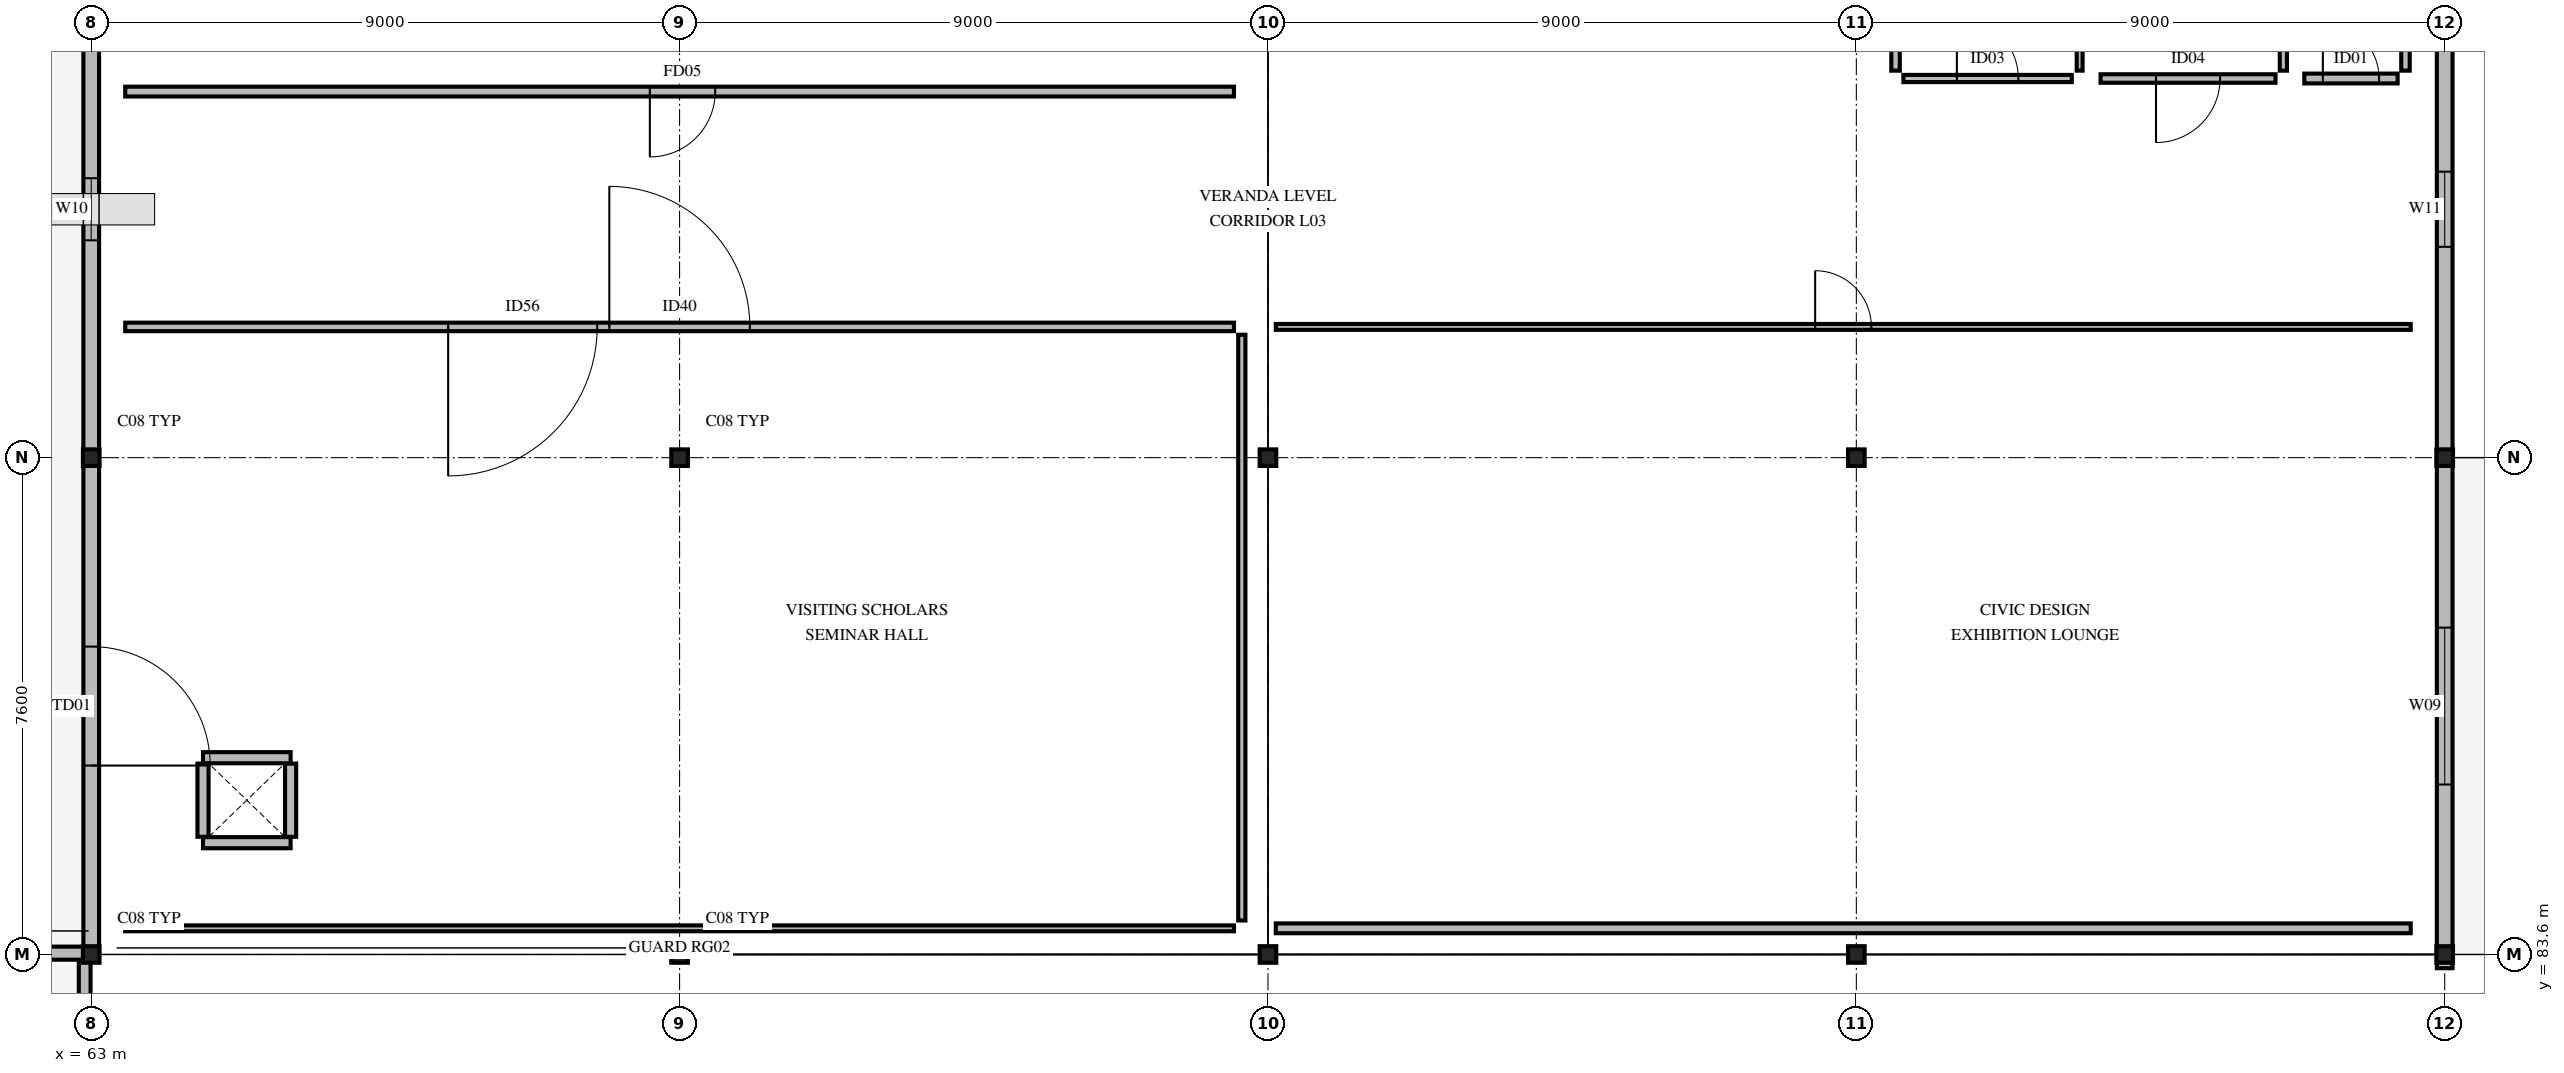
"""IFC4 building model, lengths in metres.
Left out: names, types, materials, properties, quantities, classifications, styles, units other than length and angle.
Written with IfcOpenShell. Run it as: python <this file> out.ifc"""

import sys

from ifc_helpers import new_model, si_unit, direction, frame, frame_2d, origin, origin_2d, place, context, subcontext, project, spatial, rectangle, i_section, extrude, element, fill, save


model = new_model("IFC4")
c1 = context("Model", 3, precision=1e-05, world=origin(), true_north=direction((0.0, 1.0)))
c2 = subcontext(c1, "Body", "Model", "MODEL_VIEW")
j1 = project(units=[si_unit("LENGTHUNIT", "METRE"), si_unit("PLANEANGLEUNIT", "RADIAN")], contexts=[c1])
p1 = place(None, origin())
s1 = spatial("IfcSite", under=j1, at=p1, CompositionType="ELEMENT")
p2 = place(p1, origin())
s2 = spatial("IfcBuilding", under=s1, at=p2, CompositionType="ELEMENT")
p3 = place(p2, frame((0.0, 0.0, 13.68)))
s3 = spatial("IfcBuildingStorey", under=s2, at=p3, CompositionType="ELEMENT", Elevation=13.68)
for number, where, z_axis, x_axis in (
    (1, (63.0, 83.6, 0.0), (0.0, 0.0, 1.0), (1.0, 0.0, 0.0)),
    (2, (63.0, 91.2, 0.0), (0.0, 0.0, 1.0), (1.0, 0.0, 0.0)),
    (3, (72.0, 83.6, 0.0), (0.0, 0.0, 1.0), (1.0, 0.0, 0.0)),
    (4, (72.0, 91.2, 0.0), (0.0, 0.0, 1.0), (1.0, 0.0, 0.0)),
    (5, (81.0, 83.6, 0.0), (0.0, 0.0, 1.0), (1.0, 0.0, 0.0)),
    (6, (81.0, 91.2, 0.0), (0.0, 0.0, 1.0), (1.0, 0.0, 0.0)),
    (7, (90.0, 83.6, 0.0), (0.0, 0.0, 1.0), (1.0, 0.0, 0.0)),
    (8, (90.0, 91.2, 0.0), (0.0, 0.0, 1.0), (1.0, 0.0, 0.0)),
    (9, (99.0, 83.6, 0.0), (0.0, 0.0, 1.0), (1.0, 0.0, 0.0)),
    (10, (99.0, 91.2, 0.0), (0.0, 0.0, 1.0), (1.0, 0.0, 0.0)),
):
    element("IfcColumn", number, at=place(p3, frame(where, z_axis=z_axis, x_axis=x_axis)), inside=s3, PredefinedType="COLUMN", context=c2, shape_type="SweptSolid", body=[
        extrude(i_section(OverallWidth=0.254, OverallDepth=0.253, WebThickness=0.009, FlangeThickness=0.014, FilletRadius=0.012, at=origin_2d()), origin(), (0.0, 0.0, 1.0), 4.32),
    ])
p4 = place(p3, frame((63.0, 83.6, 0.0), z_axis=(0.0, 0.0, 1.0), x_axis=(0.0, 1.0, 0.0)))
e11 = element("IfcWall", 11, at=p4, inside=s3, PredefinedType="STANDARD", context=c2, shape_type="SweptSolid", body=[
    extrude(rectangle(XDim=7.6, YDim=0.24, at=frame_2d((3.8, 0.0))), origin(), (0.0, 0.0, 1.0), 3.78),
])
p5 = place(p4, frame((2.89, 0.0, 0.0)))
e12 = element("IfcOpeningElement", 12, at=p5, cuts=e11, PredefinedType="OPENING", context=c2, shape_type="SweptSolid", body=[
    extrude(rectangle(XDim=1.82, YDim=2.2, at=frame_2d((0.91, 1.1))), frame((0.0, 0.13, 0.0), z_axis=(0.0, -1.0, 0.0), x_axis=(1.0, 0.0, 0.0)), (0.0, 0.0, 1.0), 0.26),
])
p6 = place(p3, frame((99.0, 83.39, 0.0), z_axis=(0.0, 0.0, 1.0), x_axis=(0.0, 1.0, 0.0)))
e13 = element("IfcWall", 13, at=p6, inside=s3, PredefinedType="STANDARD", context=c2, shape_type="SweptSolid", body=[
    extrude(rectangle(XDim=7.81, YDim=0.24, at=frame_2d((3.905, 0.0))), origin(), (0.0, 0.0, 1.0), 3.78),
])
p7 = place(p6, frame((2.81, 0.0, 0.85)))
e14 = element("IfcOpeningElement", 14, at=p7, cuts=e13, PredefinedType="OPENING", context=c2, shape_type="SweptSolid", body=[
    extrude(rectangle(XDim=2.4, YDim=1.2, at=frame_2d((1.2, 0.6))), frame((0.0, 0.13, 0.0), z_axis=(0.0, -1.0, 0.0), x_axis=(1.0, 0.0, 0.0)), (0.0, 0.0, 1.0), 0.26),
])
p8 = place(p3, frame((63.0, 91.2, 0.0), z_axis=(0.0, 0.0, 1.0), x_axis=(0.0, 1.0, 0.0)))
e15 = element("IfcWall", 15, at=p8, inside=s3, PredefinedType="STANDARD", context=c2, shape_type="SweptSolid", body=[
    extrude(rectangle(XDim=7.6, YDim=0.24, at=frame_2d((3.8, 0.0))), origin(), (0.0, 0.0, 1.0), 3.78),
])
p9 = place(p8, frame((3.325, 0.0, 0.85)))
e16 = element("IfcOpeningElement", 16, at=p9, cuts=e15, PredefinedType="OPENING", context=c2, shape_type="SweptSolid", body=[
    extrude(rectangle(XDim=0.95, YDim=1.35, at=frame_2d((0.475, 0.675))), frame((0.0, 0.13, 0.0), z_axis=(0.0, -1.0, 0.0), x_axis=(1.0, 0.0, 0.0)), (0.0, 0.0, 1.0), 0.26),
])
p10 = place(p3, frame((99.0, 91.2, 0.0), z_axis=(0.0, 0.0, 1.0), x_axis=(0.0, 1.0, 0.0)))
e17 = element("IfcWall", 17, at=p10, inside=s3, PredefinedType="STANDARD", context=c2, shape_type="SweptSolid", body=[
    extrude(rectangle(XDim=7.6, YDim=0.24, at=frame_2d((3.8, 0.0))), origin(), (0.0, 0.0, 1.0), 3.78),
])
p11 = place(p10, frame((3.225, 0.0, 0.85)))
e18 = element("IfcOpeningElement", 18, at=p11, cuts=e17, PredefinedType="OPENING", context=c2, shape_type="SweptSolid", body=[
    extrude(rectangle(XDim=1.15, YDim=1.35, at=frame_2d((0.575, 0.675))), frame((0.0, 0.13, 0.0), z_axis=(0.0, -1.0, 0.0), x_axis=(1.0, 0.0, 0.0)), (0.0, 0.0, 1.0), 0.26),
])
p12 = place(p3, frame((62.9, 60.85, 0.0), z_axis=(0.0, 0.0, 1.0), x_axis=(0.0, 1.0, 0.0)))
e19 = element("IfcWall", 19, at=p12, inside=s3, PredefinedType="PARAPET", context=c2, shape_type="SweptSolid", body=[
    extrude(rectangle(XDim=22.7, YDim=0.18, at=frame_2d((11.35, 0.0))), origin(), (0.0, 0.0, 1.0), 1.05),
])
p13 = place(p3, frame((54.1, 83.62, 0.0), z_axis=(0.0, 0.0, 1.0), x_axis=(1.0, 0.0, 0.0)))
e20 = element("IfcWall", 20, at=p13, inside=s3, PredefinedType="PARAPET", context=c2, shape_type="SweptSolid", body=[
    extrude(rectangle(XDim=8.8, YDim=0.2, at=frame_2d((4.4, 0.0))), origin(), (0.0, 0.0, 1.0), 1.05),
])
p14 = place(p3, frame((64.71, 85.31, 0.0), z_axis=(0.0, 0.0, 1.0), x_axis=(1.0, 0.0, 0.0)))
e21 = element("IfcWall", 21, at=p14, inside=s3, PredefinedType="PARTITIONING", context=c2, shape_type="SweptSolid", body=[
    extrude(rectangle(XDim=1.34, YDim=0.17, at=frame_2d((0.67, 0.0))), origin(), (0.0, 0.0, 1.0), 4.04),
])
p15 = place(p3, frame((66.05, 85.4, 0.0), z_axis=(0.0, 0.0, 1.0), x_axis=(0.0, 1.0, 0.0)))
e22 = element("IfcWall", 22, at=p15, inside=s3, PredefinedType="PARTITIONING", context=c2, shape_type="SweptSolid", body=[
    extrude(rectangle(XDim=1.12, YDim=0.17, at=frame_2d((0.56, 0.0))), origin(), (0.0, 0.0, 1.0), 4.04),
])
p16 = place(p3, frame((66.05, 86.61, 0.0), z_axis=(0.0, 0.0, 1.0), x_axis=(-1.0, 0.0, 0.0)))
e23 = element("IfcWall", 23, at=p16, inside=s3, PredefinedType="PARTITIONING", context=c2, shape_type="SweptSolid", body=[
    extrude(rectangle(XDim=1.34, YDim=0.17, at=frame_2d((0.67, 0.0))), origin(), (0.0, 0.0, 1.0), 4.04),
])
p17 = place(p3, frame((64.71, 86.52, 0.0), z_axis=(0.0, 0.0, 1.0), x_axis=(0.0, -1.0, 0.0)))
e24 = element("IfcWall", 24, at=p17, inside=s3, PredefinedType="PARTITIONING", context=c2, shape_type="SweptSolid", body=[
    extrude(rectangle(XDim=1.12, YDim=0.17, at=frame_2d((0.56, 0.0))), origin(), (0.0, 0.0, 1.0), 4.04),
])
p18 = place(p3, frame((63.52, 93.2, 0.0), z_axis=(0.0, 0.0, 1.0), x_axis=(1.0, 0.0, 0.0)))
e25 = element("IfcWall", 25, at=p18, inside=s3, PredefinedType="PARTITIONING", context=c2, shape_type="SweptSolid", body=[
    extrude(rectangle(XDim=16.96, YDim=0.13, at=frame_2d((8.48, 0.0))), origin(), (0.0, 0.0, 1.0), 4.04),
])
p19 = place(p18, frame((7.405, 0.0, 0.0)))
e26 = element("IfcOpeningElement", 26, at=p19, cuts=e25, PredefinedType="OPENING", context=c2, shape_type="SweptSolid", body=[
    extrude(rectangle(XDim=2.15, YDim=2.15, at=frame_2d((1.075, 1.075))), frame((0.0, 0.075, 0.0), z_axis=(0.0, -1.0, 0.0), x_axis=(1.0, 0.0, 0.0)), (0.0, 0.0, 1.0), 0.15),
])
p20 = place(p18, frame((4.94, 0.0, 0.0)))
e27 = element("IfcOpeningElement", 27, at=p20, cuts=e25, PredefinedType="OPENING", context=c2, shape_type="SweptSolid", body=[
    extrude(rectangle(XDim=2.28, YDim=2.2, at=frame_2d((1.14, 1.1))), frame((0.0, 0.075, 0.0), z_axis=(0.0, -1.0, 0.0), x_axis=(1.0, 0.0, 0.0)), (0.0, 0.0, 1.0), 0.15),
])
p21 = place(p3, frame((80.6, 84.12, 0.0), z_axis=(0.0, 0.0, 1.0), x_axis=(0.0, 1.0, 0.0)))
e28 = element("IfcWall", 28, at=p21, inside=s3, PredefinedType="PARTITIONING", context=c2, shape_type="SweptSolid", body=[
    extrude(rectangle(XDim=8.96, YDim=0.11, at=frame_2d((4.48, 0.0))), origin(), (0.0, 0.0, 1.0), 4.04),
])
p22 = place(p3, frame((63.52, 84.0, 0.0), z_axis=(0.0, 0.0, 1.0), x_axis=(1.0, 0.0, 0.0)))
e29 = element("IfcWall", 29, at=p22, inside=s3, PredefinedType="PARTITIONING", context=c2, shape_type="SweptSolid", body=[
    extrude(rectangle(XDim=16.96, YDim=0.09, at=frame_2d((8.48, 0.0))), origin(), (0.0, 0.0, 1.0), 4.04),
])
p23 = place(p3, frame((63.52, 96.8, 0.0), z_axis=(0.0, 0.0, 1.0), x_axis=(1.0, 0.0, 0.0)))
e30 = element("IfcWall", 30, at=p23, inside=s3, PredefinedType="PARTITIONING", context=c2, shape_type="SweptSolid", body=[
    extrude(rectangle(XDim=16.96, YDim=0.15, at=frame_2d((8.48, 0.0))), origin(), (0.0, 0.0, 1.0), 4.04),
])
p24 = place(p23, frame((8.025, 0.0, 0.0)))
e31 = element("IfcOpeningElement", 31, at=p24, cuts=e30, PredefinedType="OPENING", context=c2, shape_type="SweptSolid", body=[
    extrude(rectangle(XDim=1.0, YDim=2.15, at=frame_2d((0.5, 1.075))), frame((0.0, 0.085, 0.0), z_axis=(0.0, -1.0, 0.0), x_axis=(1.0, 0.0, 0.0)), (0.0, 0.0, 1.0), 0.17),
])
p25 = place(p3, frame((90.6, 97.12, 0.0), z_axis=(0.0, 0.0, 1.0), x_axis=(0.0, 1.0, 0.0)))
e32 = element("IfcWall", 32, at=p25, inside=s3, PredefinedType="PARTITIONING", context=c2, shape_type="SweptSolid", body=[
    extrude(rectangle(XDim=8.56, YDim=0.13, at=frame_2d((4.28, 0.0))), origin(), (0.0, 0.0, 1.0), 4.04),
])
p26 = place(p3, frame((90.72, 97.0, 0.0), z_axis=(0.0, 0.0, 1.0), x_axis=(1.0, 0.0, 0.0)))
e33 = element("IfcWall", 33, at=p26, inside=s3, PredefinedType="PARTITIONING", context=c2, shape_type="SweptSolid", body=[
    extrude(rectangle(XDim=2.576, YDim=0.11, at=frame_2d((1.288, 0.0))), origin(), (0.0, 0.0, 1.0), 4.04),
])
p27 = place(p26, frame((0.818, 0.0, 0.0)))
e34 = element("IfcOpeningElement", 34, at=p27, cuts=e33, PredefinedType="OPENING", context=c2, shape_type="SweptSolid", body=[
    extrude(rectangle(XDim=0.94, YDim=2.06, at=frame_2d((0.47, 1.03))), frame((0.0, 0.065, 0.0), z_axis=(0.0, -1.0, 0.0), x_axis=(1.0, 0.0, 0.0)), (0.0, 0.0, 1.0), 0.13),
])
p28 = place(p3, frame((93.416, 97.12, 0.0), z_axis=(0.0, 0.0, 1.0), x_axis=(0.0, 1.0, 0.0)))
e35 = element("IfcWall", 35, at=p28, inside=s3, PredefinedType="PARTITIONING", context=c2, shape_type="SweptSolid", body=[
    extrude(rectangle(XDim=8.56, YDim=0.09, at=frame_2d((4.28, 0.0))), origin(), (0.0, 0.0, 1.0), 4.04),
])
p29 = place(p3, frame((93.736, 97.0, 0.0), z_axis=(0.0, 0.0, 1.0), x_axis=(1.0, 0.0, 0.0)))
e36 = element("IfcWall", 36, at=p29, inside=s3, PredefinedType="PARTITIONING", context=c2, shape_type="SweptSolid", body=[
    extrude(rectangle(XDim=2.676, YDim=0.13, at=frame_2d((1.338, 0.0))), origin(), (0.0, 0.0, 1.0), 4.04),
])
p30 = place(p29, frame((0.848, 0.0, 0.0)))
e37 = element("IfcOpeningElement", 37, at=p30, cuts=e36, PredefinedType="OPENING", context=c2, shape_type="SweptSolid", body=[
    extrude(rectangle(XDim=0.98, YDim=2.06, at=frame_2d((0.49, 1.03))), frame((0.0, 0.075, 0.0), z_axis=(0.0, -1.0, 0.0), x_axis=(1.0, 0.0, 0.0)), (0.0, 0.0, 1.0), 0.15),
])
p31 = place(p3, frame((96.532, 97.12, 0.0), z_axis=(0.0, 0.0, 1.0), x_axis=(0.0, 1.0, 0.0)))
e38 = element("IfcWall", 38, at=p31, inside=s3, PredefinedType="PARTITIONING", context=c2, shape_type="SweptSolid", body=[
    extrude(rectangle(XDim=8.56, YDim=0.11, at=frame_2d((4.28, 0.0))), origin(), (0.0, 0.0, 1.0), 4.04),
])
p32 = place(p3, frame((96.852, 97.0, 0.0), z_axis=(0.0, 0.0, 1.0), x_axis=(1.0, 0.0, 0.0)))
e39 = element("IfcWall", 39, at=p32, inside=s3, PredefinedType="PARTITIONING", context=c2, shape_type="SweptSolid", body=[
    extrude(rectangle(XDim=1.428, YDim=0.15, at=frame_2d((0.714, 0.0))), origin(), (0.0, 0.0, 1.0), 4.04),
])
p33 = place(p32, frame((0.284, 0.0, 0.0)))
e40 = element("IfcOpeningElement", 40, at=p33, cuts=e39, PredefinedType="OPENING", context=c2, shape_type="SweptSolid", body=[
    extrude(rectangle(XDim=0.86, YDim=2.06, at=frame_2d((0.43, 1.03))), frame((0.0, 0.085, 0.0), z_axis=(0.0, -1.0, 0.0), x_axis=(1.0, 0.0, 0.0)), (0.0, 0.0, 1.0), 0.17),
])
p34 = place(p3, frame((98.4, 97.12, 0.0), z_axis=(0.0, 0.0, 1.0), x_axis=(0.0, 1.0, 0.0)))
e41 = element("IfcWall", 41, at=p34, inside=s3, PredefinedType="PARTITIONING", context=c2, shape_type="SweptSolid", body=[
    extrude(rectangle(XDim=8.56, YDim=0.13, at=frame_2d((4.28, 0.0))), origin(), (0.0, 0.0, 1.0), 4.04),
])
p35 = place(p3, frame((81.12, 93.2, 0.0), z_axis=(0.0, 0.0, 1.0), x_axis=(1.0, 0.0, 0.0)))
e42 = element("IfcWall", 42, at=p35, inside=s3, PredefinedType="PARTITIONING", context=c2, shape_type="SweptSolid", body=[
    extrude(rectangle(XDim=17.36, YDim=0.09, at=frame_2d((8.68, 0.0))), origin(), (0.0, 0.0, 1.0), 4.04),
])
p36 = place(p35, frame((8.25, 0.0, 0.0)))
e43 = element("IfcOpeningElement", 43, at=p36, cuts=e42, PredefinedType="OPENING", context=c2, shape_type="SweptSolid", body=[
    extrude(rectangle(XDim=0.86, YDim=2.06, at=frame_2d((0.43, 1.03))), frame((0.0, 0.055, 0.0), z_axis=(0.0, -1.0, 0.0), x_axis=(1.0, 0.0, 0.0)), (0.0, 0.0, 1.0), 0.11),
])
p37 = place(p3, frame((81.12, 84.0, 0.0), z_axis=(0.0, 0.0, 1.0), x_axis=(1.0, 0.0, 0.0)))
e44 = element("IfcWall", 44, at=p37, inside=s3, PredefinedType="PARTITIONING", context=c2, shape_type="SweptSolid", body=[
    extrude(rectangle(XDim=17.36, YDim=0.15, at=frame_2d((8.68, 0.0))), origin(), (0.0, 0.0, 1.0), 4.04),
])
p38 = place(p5, origin())
e45 = element("IfcDoor", 45, at=p38, inside=s3, OperationType="SINGLE_SWING_RIGHT", PredefinedType="DOOR", context=c2, shape_type="SweptSolid", body=[
    extrude(rectangle(XDim=1.82, YDim=2.2, at=frame_2d((0.91, 1.1))), frame((0.0, 0.025, 0.0), z_axis=(0.0, -1.0, 0.0), x_axis=(1.0, 0.0, 0.0)), (0.0, 0.0, 1.0), 0.05),
])
fill(e12, e45)
p39 = place(p7, origin())
e46 = element("IfcWindow", 46, at=p39, inside=s3, PartitioningType="SINGLE_PANEL", PredefinedType="WINDOW", context=c2, shape_type="SweptSolid", body=[
    extrude(rectangle(XDim=2.4, YDim=1.2, at=frame_2d((1.2, 0.6))), frame((0.0, 0.03, 0.0), z_axis=(0.0, -1.0, 0.0), x_axis=(1.0, 0.0, 0.0)), (0.0, 0.0, 1.0), 0.06),
])
fill(e14, e46)
p40 = place(p9, origin())
e47 = element("IfcWindow", 47, at=p40, inside=s3, PartitioningType="SINGLE_PANEL", PredefinedType="WINDOW", context=c2, shape_type="SweptSolid", body=[
    extrude(rectangle(XDim=0.95, YDim=1.35, at=frame_2d((0.475, 0.675))), frame((0.0, 0.03, 0.0), z_axis=(0.0, -1.0, 0.0), x_axis=(1.0, 0.0, 0.0)), (0.0, 0.0, 1.0), 0.06),
])
fill(e16, e47)
p41 = place(p11, origin())
e48 = element("IfcWindow", 48, at=p41, inside=s3, PartitioningType="SINGLE_PANEL", PredefinedType="WINDOW", context=c2, shape_type="SweptSolid", body=[
    extrude(rectangle(XDim=1.15, YDim=1.35, at=frame_2d((0.575, 0.675))), frame((0.0, 0.03, 0.0), z_axis=(0.0, -1.0, 0.0), x_axis=(1.0, 0.0, 0.0)), (0.0, 0.0, 1.0), 0.06),
])
fill(e18, e48)
p42 = place(p19, origin())
e49 = element("IfcDoor", 49, at=p42, inside=s3, OperationType="SINGLE_SWING_LEFT", PredefinedType="DOOR", context=c2, shape_type="SweptSolid", body=[
    extrude(rectangle(XDim=2.15, YDim=2.15, at=frame_2d((1.075, 1.075))), frame((0.0, 0.025, 0.0), z_axis=(0.0, -1.0, 0.0), x_axis=(1.0, 0.0, 0.0)), (0.0, 0.0, 1.0), 0.05),
])
fill(e26, e49)
p43 = place(p24, origin())
e50 = element("IfcDoor", 50, at=p43, inside=s3, OperationType="SINGLE_SWING_RIGHT", PredefinedType="DOOR", context=c2, shape_type="SweptSolid", body=[
    extrude(rectangle(XDim=1.0, YDim=2.15, at=frame_2d((0.5, 1.075))), frame((0.0, 0.025, 0.0), z_axis=(0.0, -1.0, 0.0), x_axis=(1.0, 0.0, 0.0)), (0.0, 0.0, 1.0), 0.05),
])
fill(e31, e50)
p44 = place(p27, origin())
e51 = element("IfcDoor", 51, at=p44, inside=s3, OperationType="SINGLE_SWING_LEFT", PredefinedType="DOOR", context=c2, shape_type="SweptSolid", body=[
    extrude(rectangle(XDim=0.94, YDim=2.06, at=frame_2d((0.47, 1.03))), frame((0.0, 0.025, 0.0), z_axis=(0.0, -1.0, 0.0), x_axis=(1.0, 0.0, 0.0)), (0.0, 0.0, 1.0), 0.05),
])
fill(e34, e51)
p45 = place(p30, origin())
e52 = element("IfcDoor", 52, at=p45, inside=s3, OperationType="SINGLE_SWING_RIGHT", PredefinedType="DOOR", context=c2, shape_type="SweptSolid", body=[
    extrude(rectangle(XDim=0.98, YDim=2.06, at=frame_2d((0.49, 1.03))), frame((0.0, 0.025, 0.0), z_axis=(0.0, -1.0, 0.0), x_axis=(1.0, 0.0, 0.0)), (0.0, 0.0, 1.0), 0.05),
])
fill(e37, e52)
p46 = place(p33, origin())
e53 = element("IfcDoor", 53, at=p46, inside=s3, OperationType="SINGLE_SWING_LEFT", PredefinedType="DOOR", context=c2, shape_type="SweptSolid", body=[
    extrude(rectangle(XDim=0.86, YDim=2.06, at=frame_2d((0.43, 1.03))), frame((0.0, 0.025, 0.0), z_axis=(0.0, -1.0, 0.0), x_axis=(1.0, 0.0, 0.0)), (0.0, 0.0, 1.0), 0.05),
])
fill(e40, e53)
p47 = place(p20, origin())
e54 = element("IfcDoor", 54, at=p47, inside=s3, OperationType="SINGLE_SWING_RIGHT", PredefinedType="DOOR", context=c2, shape_type="SweptSolid", body=[
    extrude(rectangle(XDim=2.28, YDim=2.2, at=frame_2d((1.14, 1.1))), frame((0.0, 0.025, 0.0), z_axis=(0.0, -1.0, 0.0), x_axis=(1.0, 0.0, 0.0)), (0.0, 0.0, 1.0), 0.05),
])
fill(e27, e54)
p48 = place(p36, origin())
e55 = element("IfcDoor", 55, at=p48, inside=s3, OperationType="SINGLE_SWING_LEFT", PredefinedType="DOOR", context=c2, shape_type="SweptSolid", body=[
    extrude(rectangle(XDim=0.86, YDim=2.06, at=frame_2d((0.43, 1.03))), frame((0.0, 0.025, 0.0), z_axis=(0.0, -1.0, 0.0), x_axis=(1.0, 0.0, 0.0)), (0.0, 0.0, 1.0), 0.05),
])
fill(e43, e55)
save(model, sys.argv[1])
